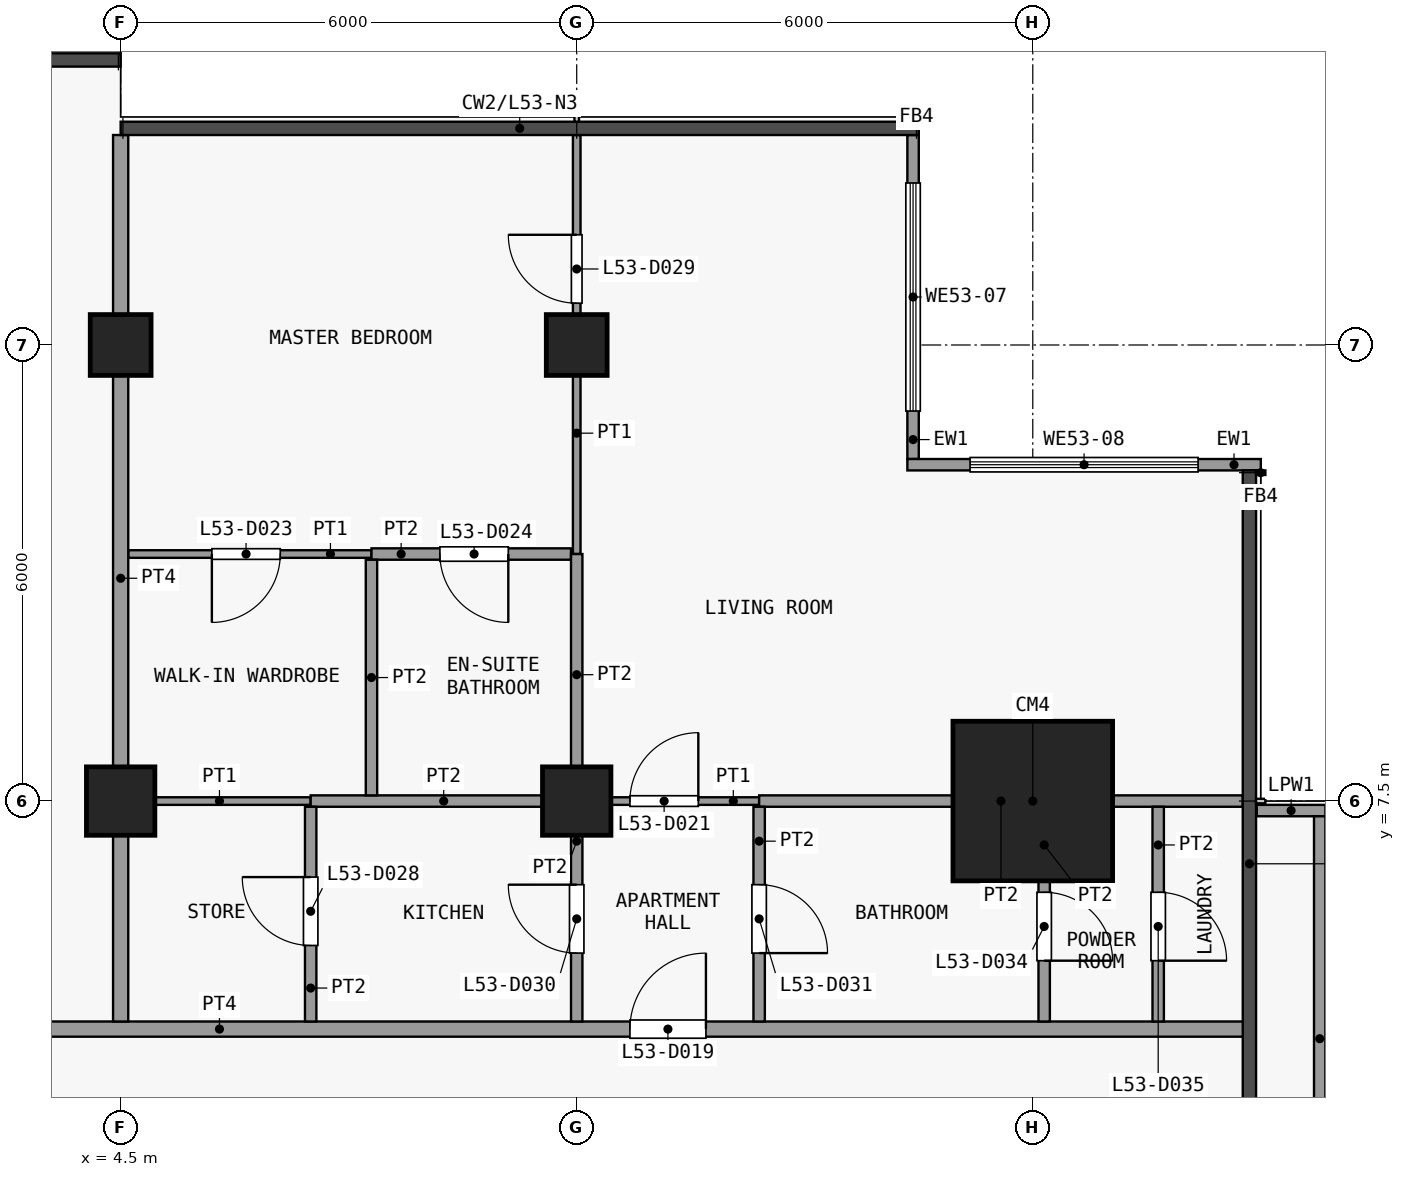
"""IFC4 building model, lengths in metres.
Left out: names, types, materials, properties, quantities, classifications, styles, units other than length and angle.
Written with IfcOpenShell. Run it as: python <this file> out.ifc"""

import sys

from ifc_helpers import new_model, si_unit, direction, frame, frame_2d, origin, origin_2d, place, context, subcontext, project, spatial, rectangle, extrude, element, fill, save


model = new_model("IFC4")
c1 = context("Model", 3, precision=1e-05, world=origin(), true_north=direction((0.0, 1.0)))
c2 = subcontext(c1, "Body", "Model", "MODEL_VIEW")
j1 = project(units=[si_unit("LENGTHUNIT", "METRE"), si_unit("PLANEANGLEUNIT", "RADIAN")], contexts=[c1])
p1 = place(None, origin())
s1 = spatial("IfcSite", under=j1, at=p1, CompositionType="ELEMENT")
p2 = place(p1, origin())
s2 = spatial("IfcBuilding", under=s1, at=p2, CompositionType="ELEMENT")
p3 = place(p2, frame((0.0, 0.0, 212.3)))
s3 = spatial("IfcBuildingStorey", under=s2, at=p3, CompositionType="ELEMENT", Elevation=212.3)
p4 = place(p3, frame((4.5, 7.5, 0.0), z_axis=(0.0, 0.0, 1.0), x_axis=(1.0, 0.0, 0.0)))
e1 = element("IfcColumn", 1, at=p4, inside=s3, PredefinedType="COLUMN", context=c2, shape_type="SweptSolid", body=[
    extrude(rectangle(XDim=0.9, YDim=0.9, at=origin_2d()), origin(), (0.0, 0.0, 1.0), 3.6),
])
p5 = place(p3, frame((4.5, 13.5, 0.0), z_axis=(0.0, 0.0, 1.0), x_axis=(1.0, 0.0, 0.0)))
e2 = element("IfcColumn", 2, at=p5, inside=s3, PredefinedType="COLUMN", context=c2, shape_type="SweptSolid", body=[
    extrude(rectangle(XDim=0.8, YDim=0.8, at=origin_2d()), origin(), (0.0, 0.0, 1.0), 3.6),
])
p6 = place(p3, frame((10.5, 7.5, 0.0), z_axis=(0.0, 0.0, 1.0), x_axis=(1.0, 0.0, 0.0)))
e3 = element("IfcColumn", 3, at=p6, inside=s3, PredefinedType="COLUMN", context=c2, shape_type="SweptSolid", body=[
    extrude(rectangle(XDim=0.9, YDim=0.9, at=origin_2d()), origin(), (0.0, 0.0, 1.0), 3.6),
])
p7 = place(p3, frame((10.5, 13.5, 0.0), z_axis=(0.0, 0.0, 1.0), x_axis=(1.0, 0.0, 0.0)))
e4 = element("IfcColumn", 4, at=p7, inside=s3, PredefinedType="COLUMN", context=c2, shape_type="SweptSolid", body=[
    extrude(rectangle(XDim=0.8, YDim=0.8, at=origin_2d()), origin(), (0.0, 0.0, 1.0), 3.6),
])
p8 = place(p3, frame((16.5, 7.5, 0.0), z_axis=(0.0, 0.0, 1.0), x_axis=(1.0, 0.0, 0.0)))
e5 = element("IfcColumn", 5, at=p8, inside=s3, PredefinedType="COLUMN", context=c2, shape_type="SweptSolid", body=[
    extrude(rectangle(XDim=2.1, YDim=2.1, at=origin_2d()), origin(), (0.0, 0.0, 1.0), 3.6),
])
p9 = place(p3, frame((14.925, 16.262, 0.0), z_axis=(0.0, 0.0, 1.0), x_axis=(0.0, -1.0, 0.0)))
e6 = element("IfcWall", 6, at=p9, inside=s3, PredefinedType="SOLIDWALL", context=c2, shape_type="SweptSolid", body=[
    extrude(rectangle(XDim=4.262, YDim=0.15, at=frame_2d((2.131, 0.0))), origin(), (0.0, 0.0, 1.0), 3.3),
])
p10 = place(p9, frame((0.631, 0.0, 0.9)))
e7 = element("IfcOpeningElement", 7, at=p10, cuts=e6, PredefinedType="OPENING", context=c2, shape_type="SweptSolid", body=[
    extrude(rectangle(XDim=3.0, YDim=2.4, at=frame_2d((1.5, 1.2))), frame((0.0, 0.085, 0.0), z_axis=(0.0, -1.0, 0.0), x_axis=(1.0, 0.0, 0.0)), (0.0, 0.0, 1.0), 0.17),
])
p11 = place(p3, frame((14.85, 11.925, 0.0), z_axis=(0.0, 0.0, 1.0), x_axis=(1.0, 0.0, 0.0)))
e8 = element("IfcWall", 8, at=p11, inside=s3, PredefinedType="SOLIDWALL", context=c2, shape_type="SweptSolid", body=[
    extrude(rectangle(XDim=4.65, YDim=0.15, at=frame_2d((2.325, 0.0))), origin(), (0.0, 0.0, 1.0), 3.3),
])
p12 = place(p11, frame((0.825, 0.0, 0.9)))
e9 = element("IfcOpeningElement", 9, at=p12, cuts=e8, PredefinedType="OPENING", context=c2, shape_type="SweptSolid", body=[
    extrude(rectangle(XDim=3.0, YDim=2.4, at=frame_2d((1.5, 1.2))), frame((0.0, 0.085, 0.0), z_axis=(0.0, -1.0, 0.0), x_axis=(1.0, 0.0, 0.0)), (0.0, 0.0, 1.0), 0.17),
])
p13 = place(p3, frame((19.448, 7.375, 0.0), z_axis=(0.0, 0.0, 1.0), x_axis=(1.0, 0.0, 0.0)))
e10 = element("IfcWall", 10, at=p13, inside=s3, PredefinedType="PARAPET", context=c2, shape_type="SweptSolid", body=[
    extrude(rectangle(XDim=0.903, YDim=0.15, at=frame_2d((0.451, 0.0))), origin(), (0.0, 0.0, 1.0), 1.15),
])
p14 = place(p3, frame((20.275, 7.3, 0.0), z_axis=(0.0, 0.0, 1.0), x_axis=(0.0, -1.0, 0.0)))
e11 = element("IfcWall", 11, at=p14, inside=s3, PredefinedType="PARAPET", context=c2, shape_type="SweptSolid", body=[
    extrude(rectangle(XDim=5.853, YDim=0.15, at=frame_2d((2.926, 0.0))), origin(), (0.0, 0.0, 1.0), 1.15),
])
p15 = place(p3, frame((-19.35, 4.5, 0.0), z_axis=(0.0, 0.0, 1.0), x_axis=(1.0, 0.0, 0.0)))
e12 = element("IfcWall", 12, at=p15, inside=s3, PredefinedType="PARTITIONING", context=c2, shape_type="SweptSolid", body=[
    extrude(rectangle(XDim=38.7, YDim=0.2, at=frame_2d((19.35, 0.0))), origin(), (0.0, 0.0, 1.0), 3.3),
])
p16 = place(p15, frame((4.55, 0.0, 0.0)))
e13 = element("IfcOpeningElement", 13, at=p16, cuts=e12, PredefinedType="OPENING", context=c2, shape_type="SweptSolid", body=[
    extrude(rectangle(XDim=1.0, YDim=2.1, at=frame_2d((0.5, 1.05))), frame((0.0, 0.11, 0.0), z_axis=(0.0, -1.0, 0.0), x_axis=(1.0, 0.0, 0.0)), (0.0, 0.0, 1.0), 0.22),
])
p17 = place(p15, frame((11.35, 0.0, 0.0)))
e14 = element("IfcOpeningElement", 14, at=p17, cuts=e12, PredefinedType="OPENING", context=c2, shape_type="SweptSolid", body=[
    extrude(rectangle(XDim=0.9, YDim=2.1, at=frame_2d((0.45, 1.05))), frame((0.0, 0.11, 0.0), z_axis=(0.0, -1.0, 0.0), x_axis=(1.0, 0.0, 0.0)), (0.0, 0.0, 1.0), 0.22),
])
p18 = place(p15, frame((18.85, 0.0, 0.0)))
e15 = element("IfcOpeningElement", 15, at=p18, cuts=e12, PredefinedType="OPENING", context=c2, shape_type="SweptSolid", body=[
    extrude(rectangle(XDim=0.9, YDim=2.1, at=frame_2d((0.45, 1.05))), frame((0.0, 0.11, 0.0), z_axis=(0.0, -1.0, 0.0), x_axis=(1.0, 0.0, 0.0)), (0.0, 0.0, 1.0), 0.22),
])
p19 = place(p15, frame((30.55, 0.0, 0.0)))
e16 = element("IfcOpeningElement", 16, at=p19, cuts=e12, PredefinedType="OPENING", context=c2, shape_type="SweptSolid", body=[
    extrude(rectangle(XDim=1.0, YDim=2.1, at=frame_2d((0.5, 1.05))), frame((0.0, 0.11, 0.0), z_axis=(0.0, -1.0, 0.0), x_axis=(1.0, 0.0, 0.0)), (0.0, 0.0, 1.0), 0.22),
])
p20 = place(p3, frame((4.6, 7.5, 0.0), z_axis=(0.0, 0.0, 1.0), x_axis=(1.0, 0.0, 0.0)))
e17 = element("IfcWall", 17, at=p20, inside=s3, PredefinedType="PARTITIONING", context=c2, shape_type="SweptSolid", body=[
    extrude(rectangle(XDim=2.4, YDim=0.1, at=frame_2d((1.2, 0.0))), origin(), (0.0, 0.0, 1.0), 3.3),
])
p21 = place(p3, frame((10.5, 7.5, 0.0), z_axis=(0.0, 0.0, 1.0), x_axis=(1.0, 0.0, 0.0)))
e18 = element("IfcWall", 18, at=p21, inside=s3, PredefinedType="PARTITIONING", context=c2, shape_type="SweptSolid", body=[
    extrude(rectangle(XDim=2.4, YDim=0.1, at=frame_2d((1.2, 0.0))), origin(), (0.0, 0.0, 1.0), 3.3),
])
p22 = place(p21, frame((0.7, 0.0, 0.0)))
e19 = element("IfcOpeningElement", 19, at=p22, cuts=e18, PredefinedType="OPENING", context=c2, shape_type="SweptSolid", body=[
    extrude(rectangle(XDim=0.9, YDim=2.1, at=frame_2d((0.45, 1.05))), frame((0.0, 0.06, 0.0), z_axis=(0.0, -1.0, 0.0), x_axis=(1.0, 0.0, 0.0)), (0.0, 0.0, 1.0), 0.12),
])
p23 = place(p3, frame((7.0, 7.5, 0.0), z_axis=(0.0, 0.0, 1.0), x_axis=(1.0, 0.0, 0.0)))
e20 = element("IfcWall", 20, at=p23, inside=s3, PredefinedType="PARTITIONING", context=c2, shape_type="SweptSolid", body=[
    extrude(rectangle(XDim=3.5, YDim=0.15, at=frame_2d((1.75, 0.0))), origin(), (0.0, 0.0, 1.0), 3.3),
])
p24 = place(p3, frame((12.9, 7.5, 0.0), z_axis=(0.0, 0.0, 1.0), x_axis=(1.0, 0.0, 0.0)))
e21 = element("IfcWall", 21, at=p24, inside=s3, PredefinedType="PARTITIONING", context=c2, shape_type="SweptSolid", body=[
    extrude(rectangle(XDim=6.363, YDim=0.15, at=frame_2d((3.181, 0.0))), origin(), (0.0, 0.0, 1.0), 3.3),
])
p25 = place(p3, frame((4.6, 10.75, 0.0), z_axis=(0.0, 0.0, 1.0), x_axis=(1.0, 0.0, 0.0)))
e22 = element("IfcWall", 22, at=p25, inside=s3, PredefinedType="PARTITIONING", context=c2, shape_type="SweptSolid", body=[
    extrude(rectangle(XDim=3.2, YDim=0.1, at=frame_2d((1.6, 0.0))), origin(), (0.0, 0.0, 1.0), 3.3),
])
p26 = place(p25, frame((1.1, 0.0, 0.0)))
e23 = element("IfcOpeningElement", 23, at=p26, cuts=e22, PredefinedType="OPENING", context=c2, shape_type="SweptSolid", body=[
    extrude(rectangle(XDim=0.9, YDim=2.1, at=frame_2d((0.45, 1.05))), frame((0.0, 0.06, 0.0), z_axis=(0.0, -1.0, 0.0), x_axis=(1.0, 0.0, 0.0)), (0.0, 0.0, 1.0), 0.12),
])
p27 = place(p3, frame((7.8, 10.75, 0.0), z_axis=(0.0, 0.0, 1.0), x_axis=(1.0, 0.0, 0.0)))
e24 = element("IfcWall", 24, at=p27, inside=s3, PredefinedType="PARTITIONING", context=c2, shape_type="SweptSolid", body=[
    extrude(rectangle(XDim=2.625, YDim=0.15, at=frame_2d((1.312, 0.0))), origin(), (0.0, 0.0, 1.0), 3.3),
])
p28 = place(p27, frame((0.9, 0.0, 0.0)))
e25 = element("IfcOpeningElement", 25, at=p28, cuts=e24, PredefinedType="OPENING", context=c2, shape_type="SweptSolid", body=[
    extrude(rectangle(XDim=0.9, YDim=2.1, at=frame_2d((0.45, 1.05))), frame((0.0, 0.085, 0.0), z_axis=(0.0, -1.0, 0.0), x_axis=(1.0, 0.0, 0.0)), (0.0, 0.0, 1.0), 0.17),
])
p29 = place(p3, frame((4.5, 4.6, 0.0), z_axis=(0.0, 0.0, 1.0), x_axis=(0.0, 1.0, 0.0)))
e26 = element("IfcWall", 26, at=p29, inside=s3, PredefinedType="PARTITIONING", context=c2, shape_type="SweptSolid", body=[
    extrude(rectangle(XDim=11.662, YDim=0.2, at=frame_2d((5.831, 0.0))), origin(), (0.0, 0.0, 1.0), 3.3),
])
p30 = place(p3, frame((7.0, 4.6, 0.0), z_axis=(0.0, 0.0, 1.0), x_axis=(0.0, 1.0, 0.0)))
e27 = element("IfcWall", 27, at=p30, inside=s3, PredefinedType="PARTITIONING", context=c2, shape_type="SweptSolid", body=[
    extrude(rectangle(XDim=2.825, YDim=0.15, at=frame_2d((1.413, 0.0))), origin(), (0.0, 0.0, 1.0), 3.3),
])
p31 = place(p30, frame((1.0, 0.0, 0.0)))
e28 = element("IfcOpeningElement", 28, at=p31, cuts=e27, PredefinedType="OPENING", context=c2, shape_type="SweptSolid", body=[
    extrude(rectangle(XDim=0.9, YDim=2.1, at=frame_2d((0.45, 1.05))), frame((0.0, 0.085, 0.0), z_axis=(0.0, -1.0, 0.0), x_axis=(1.0, 0.0, 0.0)), (0.0, 0.0, 1.0), 0.17),
])
p32 = place(p3, frame((7.8, 7.575, 0.0), z_axis=(0.0, 0.0, 1.0), x_axis=(0.0, 1.0, 0.0)))
e29 = element("IfcWall", 29, at=p32, inside=s3, PredefinedType="PARTITIONING", context=c2, shape_type="SweptSolid", body=[
    extrude(rectangle(XDim=3.1, YDim=0.15, at=frame_2d((1.55, 0.0))), origin(), (0.0, 0.0, 1.0), 3.3),
])
p33 = place(p3, frame((10.5, 10.75, 0.0), z_axis=(0.0, 0.0, 1.0), x_axis=(0.0, 1.0, 0.0)))
e30 = element("IfcWall", 30, at=p33, inside=s3, PredefinedType="PARTITIONING", context=c2, shape_type="SweptSolid", body=[
    extrude(rectangle(XDim=5.512, YDim=0.1, at=frame_2d((2.756, 0.0))), origin(), (0.0, 0.0, 1.0), 3.3),
])
p34 = place(p33, frame((3.3, 0.0, 0.0)))
e31 = element("IfcOpeningElement", 31, at=p34, cuts=e30, PredefinedType="OPENING", context=c2, shape_type="SweptSolid", body=[
    extrude(rectangle(XDim=0.9, YDim=2.1, at=frame_2d((0.45, 1.05))), frame((0.0, 0.06, 0.0), z_axis=(0.0, -1.0, 0.0), x_axis=(1.0, 0.0, 0.0)), (0.0, 0.0, 1.0), 0.12),
])
p35 = place(p3, frame((10.5, 4.6, 0.0), z_axis=(0.0, 0.0, 1.0), x_axis=(0.0, 1.0, 0.0)))
e32 = element("IfcWall", 32, at=p35, inside=s3, PredefinedType="PARTITIONING", context=c2, shape_type="SweptSolid", body=[
    extrude(rectangle(XDim=2.825, YDim=0.15, at=frame_2d((1.413, 0.0))), origin(), (0.0, 0.0, 1.0), 3.3),
])
p36 = place(p35, frame((0.9, 0.0, 0.0)))
e33 = element("IfcOpeningElement", 33, at=p36, cuts=e32, PredefinedType="OPENING", context=c2, shape_type="SweptSolid", body=[
    extrude(rectangle(XDim=0.9, YDim=2.1, at=frame_2d((0.45, 1.05))), frame((0.0, 0.085, 0.0), z_axis=(0.0, -1.0, 0.0), x_axis=(1.0, 0.0, 0.0)), (0.0, 0.0, 1.0), 0.17),
])
p37 = place(p3, frame((10.5, 7.575, 0.0), z_axis=(0.0, 0.0, 1.0), x_axis=(0.0, 1.0, 0.0)))
e34 = element("IfcWall", 34, at=p37, inside=s3, PredefinedType="PARTITIONING", context=c2, shape_type="SweptSolid", body=[
    extrude(rectangle(XDim=3.175, YDim=0.15, at=frame_2d((1.587, 0.0))), origin(), (0.0, 0.0, 1.0), 3.3),
])
p38 = place(p3, frame((12.9, 4.6, 0.0), z_axis=(0.0, 0.0, 1.0), x_axis=(0.0, 1.0, 0.0)))
e35 = element("IfcWall", 35, at=p38, inside=s3, PredefinedType="PARTITIONING", context=c2, shape_type="SweptSolid", body=[
    extrude(rectangle(XDim=2.825, YDim=0.15, at=frame_2d((1.413, 0.0))), origin(), (0.0, 0.0, 1.0), 3.3),
])
p39 = place(p38, frame((0.9, 0.0, 0.0)))
e36 = element("IfcOpeningElement", 36, at=p39, cuts=e35, PredefinedType="OPENING", context=c2, shape_type="SweptSolid", body=[
    extrude(rectangle(XDim=0.9, YDim=2.1, at=frame_2d((0.45, 1.05))), frame((0.0, 0.085, 0.0), z_axis=(0.0, -1.0, 0.0), x_axis=(1.0, 0.0, 0.0)), (0.0, 0.0, 1.0), 0.17),
])
p40 = place(p3, frame((16.65, 4.6, 0.0), z_axis=(0.0, 0.0, 1.0), x_axis=(0.0, 1.0, 0.0)))
e37 = element("IfcWall", 37, at=p40, inside=s3, PredefinedType="PARTITIONING", context=c2, shape_type="SweptSolid", body=[
    extrude(rectangle(XDim=2.825, YDim=0.15, at=frame_2d((1.413, 0.0))), origin(), (0.0, 0.0, 1.0), 3.3),
])
p41 = place(p40, frame((0.8, 0.0, 0.0)))
e38 = element("IfcOpeningElement", 38, at=p41, cuts=e37, PredefinedType="OPENING", context=c2, shape_type="SweptSolid", body=[
    extrude(rectangle(XDim=0.9, YDim=2.1, at=frame_2d((0.45, 1.05))), frame((0.0, 0.085, 0.0), z_axis=(0.0, -1.0, 0.0), x_axis=(1.0, 0.0, 0.0)), (0.0, 0.0, 1.0), 0.17),
])
p42 = place(p3, frame((18.15, 4.6, 0.0), z_axis=(0.0, 0.0, 1.0), x_axis=(0.0, 1.0, 0.0)))
e39 = element("IfcWall", 39, at=p42, inside=s3, PredefinedType="PARTITIONING", context=c2, shape_type="SweptSolid", body=[
    extrude(rectangle(XDim=2.825, YDim=0.15, at=frame_2d((1.413, 0.0))), origin(), (0.0, 0.0, 1.0), 3.3),
])
p43 = place(p42, frame((0.8, 0.0, 0.0)))
e40 = element("IfcOpeningElement", 40, at=p43, cuts=e39, PredefinedType="OPENING", context=c2, shape_type="SweptSolid", body=[
    extrude(rectangle(XDim=0.9, YDim=2.1, at=frame_2d((0.45, 1.05))), frame((0.0, 0.085, 0.0), z_axis=(0.0, -1.0, 0.0), x_axis=(1.0, 0.0, 0.0)), (0.0, 0.0, 1.0), 0.17),
])
p44 = place(p10, origin())
e41 = element("IfcWindow", 41, at=p44, inside=s3, PartitioningType="SINGLE_PANEL", PredefinedType="WINDOW", context=c2, shape_type="SweptSolid", body=[
    extrude(rectangle(XDim=3.0, YDim=2.4, at=frame_2d((1.5, 1.2))), frame((0.0, 0.03, 0.0), z_axis=(0.0, -1.0, 0.0), x_axis=(1.0, 0.0, 0.0)), (0.0, 0.0, 1.0), 0.06),
])
fill(e7, e41)
p45 = place(p12, origin())
e42 = element("IfcWindow", 42, at=p45, inside=s3, PartitioningType="SINGLE_PANEL", PredefinedType="WINDOW", context=c2, shape_type="SweptSolid", body=[
    extrude(rectangle(XDim=3.0, YDim=2.4, at=frame_2d((1.5, 1.2))), frame((0.0, 0.03, 0.0), z_axis=(0.0, -1.0, 0.0), x_axis=(1.0, 0.0, 0.0)), (0.0, 0.0, 1.0), 0.06),
])
fill(e9, e42)
p46 = place(p19, origin())
e43 = element("IfcDoor", 43, at=p46, inside=s3, OperationType="SINGLE_SWING_LEFT", PredefinedType="DOOR", context=c2, shape_type="SweptSolid", body=[
    extrude(rectangle(XDim=1.0, YDim=2.1, at=frame_2d((0.5, 1.05))), frame((0.0, 0.025, 0.0), z_axis=(0.0, -1.0, 0.0), x_axis=(1.0, 0.0, 0.0)), (0.0, 0.0, 1.0), 0.05),
])
fill(e16, e43)
p47 = place(p22, origin())
e44 = element("IfcDoor", 44, at=p47, inside=s3, OperationType="SINGLE_SWING_LEFT", PredefinedType="DOOR", context=c2, shape_type="SweptSolid", body=[
    extrude(rectangle(XDim=0.9, YDim=2.1, at=frame_2d((0.45, 1.05))), frame((0.0, 0.025, 0.0), z_axis=(0.0, -1.0, 0.0), x_axis=(1.0, 0.0, 0.0)), (0.0, 0.0, 1.0), 0.05),
])
fill(e19, e44)
p48 = place(p26, origin())
e45 = element("IfcDoor", 45, at=p48, inside=s3, OperationType="SINGLE_SWING_LEFT", PredefinedType="DOOR", context=c2, shape_type="SweptSolid", body=[
    extrude(rectangle(XDim=0.9, YDim=2.1, at=frame_2d((0.45, 1.05))), frame((0.0, 0.025, 0.0), z_axis=(0.0, -1.0, 0.0), x_axis=(1.0, 0.0, 0.0)), (0.0, 0.0, 1.0), 0.05),
])
fill(e23, e45)
p49 = place(p28, origin())
e46 = element("IfcDoor", 46, at=p49, inside=s3, OperationType="SINGLE_SWING_RIGHT", PredefinedType="DOOR", context=c2, shape_type="SweptSolid", body=[
    extrude(rectangle(XDim=0.9, YDim=2.1, at=frame_2d((0.45, 1.05))), frame((0.0, 0.025, 0.0), z_axis=(0.0, -1.0, 0.0), x_axis=(1.0, 0.0, 0.0)), (0.0, 0.0, 1.0), 0.05),
])
fill(e25, e46)
p50 = place(p31, origin())
e47 = element("IfcDoor", 47, at=p50, inside=s3, OperationType="SINGLE_SWING_LEFT", PredefinedType="DOOR", context=c2, shape_type="SweptSolid", body=[
    extrude(rectangle(XDim=0.9, YDim=2.1, at=frame_2d((0.45, 1.05))), frame((0.0, 0.025, 0.0), z_axis=(0.0, -1.0, 0.0), x_axis=(1.0, 0.0, 0.0)), (0.0, 0.0, 1.0), 0.05),
])
fill(e28, e47)
p51 = place(p34, origin())
e48 = element("IfcDoor", 48, at=p51, inside=s3, OperationType="SINGLE_SWING_LEFT", PredefinedType="DOOR", context=c2, shape_type="SweptSolid", body=[
    extrude(rectangle(XDim=0.9, YDim=2.1, at=frame_2d((0.45, 1.05))), frame((0.0, 0.025, 0.0), z_axis=(0.0, -1.0, 0.0), x_axis=(1.0, 0.0, 0.0)), (0.0, 0.0, 1.0), 0.05),
])
fill(e31, e48)
p52 = place(p36, origin())
e49 = element("IfcDoor", 49, at=p52, inside=s3, OperationType="SINGLE_SWING_LEFT", PredefinedType="DOOR", context=c2, shape_type="SweptSolid", body=[
    extrude(rectangle(XDim=0.9, YDim=2.1, at=frame_2d((0.45, 1.05))), frame((0.0, 0.025, 0.0), z_axis=(0.0, -1.0, 0.0), x_axis=(1.0, 0.0, 0.0)), (0.0, 0.0, 1.0), 0.05),
])
fill(e33, e49)
p53 = place(p39, origin())
e50 = element("IfcDoor", 50, at=p53, inside=s3, OperationType="SINGLE_SWING_LEFT", PredefinedType="DOOR", context=c2, shape_type="SweptSolid", body=[
    extrude(rectangle(XDim=0.9, YDim=2.1, at=frame_2d((0.45, 1.05))), frame((0.0, 0.025, 0.0), z_axis=(0.0, -1.0, 0.0), x_axis=(1.0, 0.0, 0.0)), (0.0, 0.0, 1.0), 0.05),
])
fill(e36, e50)
p54 = place(p41, origin())
e51 = element("IfcDoor", 51, at=p54, inside=s3, OperationType="SINGLE_SWING_LEFT", PredefinedType="DOOR", context=c2, shape_type="SweptSolid", body=[
    extrude(rectangle(XDim=0.9, YDim=2.1, at=frame_2d((0.45, 1.05))), frame((0.0, 0.025, 0.0), z_axis=(0.0, -1.0, 0.0), x_axis=(1.0, 0.0, 0.0)), (0.0, 0.0, 1.0), 0.05),
])
fill(e38, e51)
p55 = place(p43, origin())
e52 = element("IfcDoor", 52, at=p55, inside=s3, OperationType="SINGLE_SWING_LEFT", PredefinedType="DOOR", context=c2, shape_type="SweptSolid", body=[
    extrude(rectangle(XDim=0.9, YDim=2.1, at=frame_2d((0.45, 1.05))), frame((0.0, 0.025, 0.0), z_axis=(0.0, -1.0, 0.0), x_axis=(1.0, 0.0, 0.0)), (0.0, 0.0, 1.0), 0.05),
])
fill(e40, e52)
save(model, sys.argv[1])
